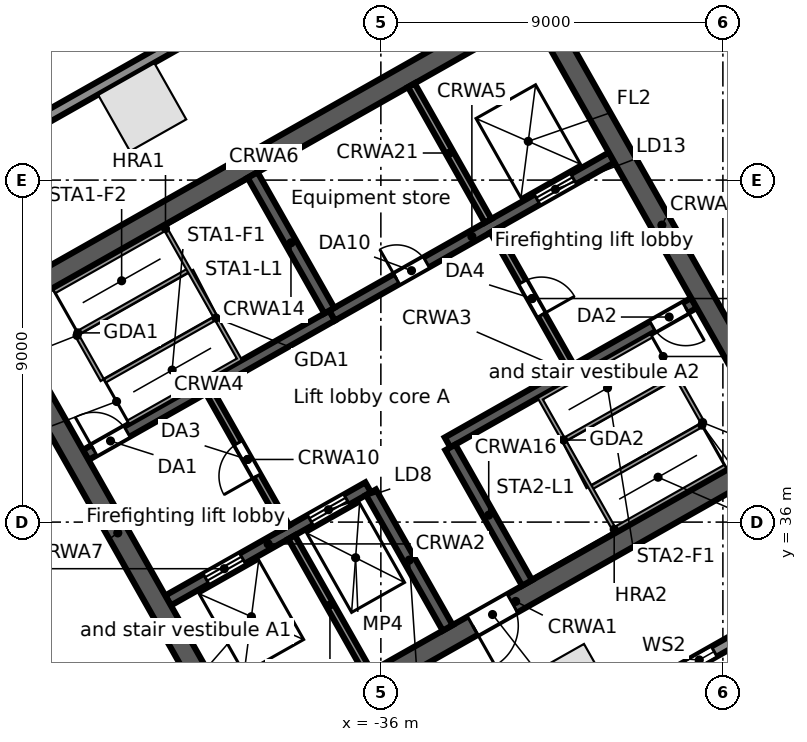
"""IFC4 building model, lengths in metres.
Left out: names, types, materials, properties, quantities, classifications, styles, units other than length and angle.
Written with IfcOpenShell. Run it as: python <this file> out.ifc"""

import sys

from ifc_helpers import new_model, si_unit, direction, frame, frame_2d, origin, origin_2d, place, context, subcontext, project, spatial, rectangle, extrude, element, fill, save


model = new_model("IFC4")
c1 = context("Model", 3, precision=1e-05, world=origin(), true_north=direction((0.0, 1.0)))
c2 = subcontext(c1, "Body", "Model", "MODEL_VIEW")
j1 = project(units=[si_unit("LENGTHUNIT", "METRE"), si_unit("PLANEANGLEUNIT", "RADIAN")], contexts=[c1])
p1 = place(None, origin())
s1 = spatial("IfcSite", under=j1, at=p1, CompositionType="ELEMENT")
p2 = place(p1, origin())
s2 = spatial("IfcBuilding", under=s1, at=p2, CompositionType="ELEMENT")
p3 = place(p2, frame((0.0, 0.0, 110.3)))
s3 = spatial("IfcBuildingStorey", under=s2, at=p3, CompositionType="ELEMENT", Elevation=110.3)
for number, where, z_axis, x_axis in (
    (1, (-42.28, 46.919, 0.0), (0.0, 0.0, 1.0), (-0.87, -0.492, 0.0)),
    (2, (-30.976, 31.635, 0.0), (0.0, 0.0, 1.0), (0.87, 0.492, 0.0)),
):
    element("IfcColumn", number, at=place(p3, frame(where, z_axis=z_axis, x_axis=x_axis)), inside=s3, PredefinedType="COLUMN", context=c2, shape_type="SweptSolid", body=[
        extrude(rectangle(XDim=1.7, YDim=1.7, at=origin_2d()), origin(), (0.0, 0.0, 1.0), 4.4),
    ])
p4 = place(p3, frame((-58.745, 38.764, 0.0), z_axis=(0.0, 0.0, 1.0), x_axis=(0.870355811726, 0.492423355453, 0.0)))
e3 = element("IfcWall", 3, at=p4, inside=s3, PredefinedType="STANDARD", context=c2, shape_type="SweptSolid", body=[
    extrude(rectangle(XDim=64.025, YDim=0.3, at=frame_2d((32.013, 0.0))), origin(), (0.0, 0.0, 1.0), 4.08),
])
p5 = place(p4, frame((60.122, 0.0, 0.6)))
e4 = element("IfcOpeningElement", 4, at=p5, cuts=e3, PredefinedType="OPENING", context=c2, shape_type="SweptSolid", body=[
    extrude(rectangle(XDim=0.9, YDim=2.8, at=frame_2d((0.45, 1.4))), frame((0.0, 0.16, 0.0), z_axis=(0.0, -1.0, 0.0), x_axis=(1.0, 0.0, 0.0)), (0.0, 0.0, 1.0), 0.32),
])
p6 = place(p4, frame((50.992, 0.0, 0.6)))
e5 = element("IfcOpeningElement", 5, at=p6, cuts=e3, PredefinedType="OPENING", context=c2, shape_type="SweptSolid", body=[
    extrude(rectangle(XDim=0.9, YDim=2.8, at=frame_2d((0.45, 1.4))), frame((0.0, 0.16, 0.0), z_axis=(0.0, -1.0, 0.0), x_axis=(1.0, 0.0, 0.0)), (0.0, 0.0, 1.0), 0.32),
])
p7 = place(p4, frame((41.862, 0.0, 0.6)))
e6 = element("IfcOpeningElement", 6, at=p7, cuts=e3, PredefinedType="OPENING", context=c2, shape_type="SweptSolid", body=[
    extrude(rectangle(XDim=0.9, YDim=2.8, at=frame_2d((0.45, 1.4))), frame((0.0, 0.16, 0.0), z_axis=(0.0, -1.0, 0.0), x_axis=(1.0, 0.0, 0.0)), (0.0, 0.0, 1.0), 0.32),
])
p8 = place(p4, frame((32.732, 0.0, 0.6)))
e7 = element("IfcOpeningElement", 7, at=p8, cuts=e3, PredefinedType="OPENING", context=c2, shape_type="SweptSolid", body=[
    extrude(rectangle(XDim=0.9, YDim=2.8, at=frame_2d((0.45, 1.4))), frame((0.0, 0.16, 0.0), z_axis=(0.0, -1.0, 0.0), x_axis=(1.0, 0.0, 0.0)), (0.0, 0.0, 1.0), 0.32),
])
p9 = place(p4, frame((23.602, 0.0, 0.6)))
e8 = element("IfcOpeningElement", 8, at=p9, cuts=e3, PredefinedType="OPENING", context=c2, shape_type="SweptSolid", body=[
    extrude(rectangle(XDim=0.9, YDim=2.8, at=frame_2d((0.45, 1.4))), frame((0.0, 0.16, 0.0), z_axis=(0.0, -1.0, 0.0), x_axis=(1.0, 0.0, 0.0)), (0.0, 0.0, 1.0), 0.32),
])
p10 = place(p4, frame((14.472, 0.0, 0.6)))
e9 = element("IfcOpeningElement", 9, at=p10, cuts=e3, PredefinedType="OPENING", context=c2, shape_type="SweptSolid", body=[
    extrude(rectangle(XDim=0.9, YDim=2.8, at=frame_2d((0.45, 1.4))), frame((0.0, 0.16, 0.0), z_axis=(0.0, -1.0, 0.0), x_axis=(1.0, 0.0, 0.0)), (0.0, 0.0, 1.0), 0.32),
])
p11 = place(p4, frame((5.342, 0.0, 0.6)))
e10 = element("IfcOpeningElement", 10, at=p11, cuts=e3, PredefinedType="OPENING", context=c2, shape_type="SweptSolid", body=[
    extrude(rectangle(XDim=0.9, YDim=2.8, at=frame_2d((0.45, 1.4))), frame((0.0, 0.16, 0.0), z_axis=(0.0, -1.0, 0.0), x_axis=(1.0, 0.0, 0.0)), (0.0, 0.0, 1.0), 0.32),
])
p12 = place(p3, frame((-44.109, 26.504, 0.0), z_axis=(0.0, 0.0, 1.0), x_axis=(-0.857169502585, 0.515034410344, 0.0)))
e11 = element("IfcWall", 11, at=p12, inside=s3, PredefinedType="STANDARD", context=c2, shape_type="SweptSolid", body=[
    extrude(rectangle(XDim=17.127, YDim=0.3, at=frame_2d((8.563, 0.0))), origin(), (0.0, 0.0, 1.0), 4.08),
])
p13 = place(p12, frame((13.403, 0.0, 0.6)))
e12 = element("IfcOpeningElement", 12, at=p13, cuts=e11, PredefinedType="OPENING", context=c2, shape_type="SweptSolid", body=[
    extrude(rectangle(XDim=0.9, YDim=2.8, at=frame_2d((0.45, 1.4))), frame((0.0, 0.16, 0.0), z_axis=(0.0, -1.0, 0.0), x_axis=(1.0, 0.0, 0.0)), (0.0, 0.0, 1.0), 0.32),
])
p14 = place(p12, frame((4.903, 0.0, 0.6)))
e13 = element("IfcOpeningElement", 13, at=p14, cuts=e11, PredefinedType="OPENING", context=c2, shape_type="SweptSolid", body=[
    extrude(rectangle(XDim=0.9, YDim=2.8, at=frame_2d((0.45, 1.4))), frame((0.0, 0.16, 0.0), z_axis=(0.0, -1.0, 0.0), x_axis=(1.0, 0.0, 0.0)), (0.0, 0.0, 1.0), 0.32),
])
p15 = place(p3, frame((-0.055, 47.969, 0.0), z_axis=(0.0, 0.0, 1.0), x_axis=(-0.870355730478, -0.492423499058, 0.0)))
e14 = element("IfcWall", 14, at=p15, inside=s3, PredefinedType="STANDARD", context=c2, shape_type="SweptSolid", body=[
    extrude(rectangle(XDim=43.75, YDim=0.3, at=frame_2d((21.875, 0.0))), origin(), (0.0, 0.0, 1.0), 4.08),
])
p16 = place(p15, frame((39.977, 0.0, 0.6)))
e15 = element("IfcOpeningElement", 15, at=p16, cuts=e14, PredefinedType="OPENING", context=c2, shape_type="SweptSolid", body=[
    extrude(rectangle(XDim=0.9, YDim=2.8, at=frame_2d((0.45, 1.4))), frame((0.0, 0.16, 0.0), z_axis=(0.0, -1.0, 0.0), x_axis=(1.0, 0.0, 0.0)), (0.0, 0.0, 1.0), 0.32),
])
p17 = place(p15, frame((31.222, 0.0, 0.6)))
e16 = element("IfcOpeningElement", 16, at=p17, cuts=e14, PredefinedType="OPENING", context=c2, shape_type="SweptSolid", body=[
    extrude(rectangle(XDim=0.9, YDim=2.8, at=frame_2d((0.45, 1.4))), frame((0.0, 0.16, 0.0), z_axis=(0.0, -1.0, 0.0), x_axis=(1.0, 0.0, 0.0)), (0.0, 0.0, 1.0), 0.32),
])
p18 = place(p15, frame((22.468, 0.0, 0.6)))
e17 = element("IfcOpeningElement", 17, at=p18, cuts=e14, PredefinedType="OPENING", context=c2, shape_type="SweptSolid", body=[
    extrude(rectangle(XDim=0.9, YDim=2.8, at=frame_2d((0.45, 1.4))), frame((0.0, 0.16, 0.0), z_axis=(0.0, -1.0, 0.0), x_axis=(1.0, 0.0, 0.0)), (0.0, 0.0, 1.0), 0.32),
])
p19 = place(p15, frame((13.713, 0.0, 0.6)))
e18 = element("IfcOpeningElement", 18, at=p19, cuts=e14, PredefinedType="OPENING", context=c2, shape_type="SweptSolid", body=[
    extrude(rectangle(XDim=0.9, YDim=2.8, at=frame_2d((0.45, 1.4))), frame((0.0, 0.16, 0.0), z_axis=(0.0, -1.0, 0.0), x_axis=(1.0, 0.0, 0.0)), (0.0, 0.0, 1.0), 0.32),
])
p20 = place(p15, frame((4.959, 0.0, 0.6)))
e19 = element("IfcOpeningElement", 19, at=p20, cuts=e14, PredefinedType="OPENING", context=c2, shape_type="SweptSolid", body=[
    extrude(rectangle(XDim=0.9, YDim=2.8, at=frame_2d((0.45, 1.4))), frame((0.0, 0.16, 0.0), z_axis=(0.0, -1.0, 0.0), x_axis=(1.0, 0.0, 0.0)), (0.0, 0.0, 1.0), 0.32),
])
p21 = place(p3, frame((-39.85, 29.727, 0.0), z_axis=(0.0, 0.0, 1.0), x_axis=(0.870359753402, 0.492416388494, 0.0)))
e20 = element("IfcWall", 20, at=p21, inside=s3, PredefinedType="SOLIDWALL", context=c2, shape_type="SweptSolid", body=[
    extrude(rectangle(XDim=17.0, YDim=0.55, at=frame_2d((8.5, 0.0))), origin(), (0.0, 0.0, 1.0), 4.08),
])
p22 = place(p21, frame((7.2, 0.0, 0.0)))
e21 = element("IfcOpeningElement", 21, at=p22, cuts=e20, PredefinedType="OPENING", context=c2, shape_type="SweptSolid", body=[
    extrude(rectangle(XDim=1.2, YDim=2.1, at=frame_2d((0.6, 1.05))), frame((0.0, 0.285, 0.0), z_axis=(0.0, -1.0, 0.0), x_axis=(1.0, 0.0, 0.0)), (0.0, 0.0, 1.0), 0.57),
])
p23 = place(p3, frame((-41.6, 33.936, 0.0), z_axis=(0.0, 0.0, 1.0), x_axis=(0.870348557882, 0.492436176365, 0.0)))
e22 = element("IfcWall", 22, at=p23, inside=s3, PredefinedType="SOLIDWALL", context=c2, shape_type="SweptSolid", body=[
    extrude(rectangle(XDim=6.05, YDim=0.3, at=frame_2d((3.025, 0.0))), origin(), (0.0, 0.0, 1.0), 4.08),
])
p24 = place(p23, frame((1.15, 0.0, 0.0)))
e23 = element("IfcOpeningElement", 23, at=p24, cuts=e22, PredefinedType="OPENING", context=c2, shape_type="SweptSolid", body=[
    extrude(rectangle(XDim=1.1, YDim=2.1, at=frame_2d((0.55, 1.05))), frame((0.0, 0.16, 0.0), z_axis=(0.0, -1.0, 0.0), x_axis=(1.0, 0.0, 0.0)), (0.0, 0.0, 1.0), 0.32),
])
p25 = place(p23, frame((4.3, 0.0, 0.0)))
e24 = element("IfcOpeningElement", 24, at=p25, cuts=e22, PredefinedType="OPENING", context=c2, shape_type="SweptSolid", body=[
    extrude(rectangle(XDim=1.1, YDim=2.1, at=frame_2d((0.55, 1.05))), frame((0.0, 0.16, 0.0), z_axis=(0.0, -1.0, 0.0), x_axis=(1.0, 0.0, 0.0)), (0.0, 0.0, 1.0), 0.32),
])
p26 = place(p3, frame((-34.245, 38.097, 0.0), z_axis=(0.0, 0.0, 1.0), x_axis=(0.870360741098, 0.49241464271, 0.0)))
e25 = element("IfcWall", 25, at=p26, inside=s3, PredefinedType="SOLIDWALL", context=c2, shape_type="SweptSolid", body=[
    extrude(rectangle(XDim=7.45, YDim=0.3, at=frame_2d((3.725, 0.0))), origin(), (0.0, 0.0, 1.0), 4.08),
])
p27 = place(p26, frame((6.2, 0.0, 0.0)))
e26 = element("IfcOpeningElement", 26, at=p27, cuts=e25, PredefinedType="OPENING", context=c2, shape_type="SweptSolid", body=[
    extrude(rectangle(XDim=1.0, YDim=2.1, at=frame_2d((0.5, 1.05))), frame((0.0, 0.16, 0.0), z_axis=(0.0, -1.0, 0.0), x_axis=(1.0, 0.0, 0.0)), (0.0, 0.0, 1.0), 0.32),
])
p28 = place(p3, frame((-43.766, 37.766, 0.0), z_axis=(0.0, 0.0, 1.0), x_axis=(0.870346696097, 0.492439466932, 0.0)))
e27 = element("IfcWall", 27, at=p28, inside=s3, PredefinedType="SOLIDWALL", context=c2, shape_type="SweptSolid", body=[
    extrude(rectangle(XDim=7.45, YDim=0.3, at=frame_2d((3.725, 0.0))), origin(), (0.0, 0.0, 1.0), 4.08),
])
p29 = place(p28, frame((0.25, 0.0, 0.0)))
e28 = element("IfcOpeningElement", 28, at=p29, cuts=e27, PredefinedType="OPENING", context=c2, shape_type="SweptSolid", body=[
    extrude(rectangle(XDim=1.0, YDim=2.1, at=frame_2d((0.5, 1.05))), frame((0.0, 0.16, 0.0), z_axis=(0.0, -1.0, 0.0), x_axis=(1.0, 0.0, 0.0)), (0.0, 0.0, 1.0), 0.32),
])
p30 = place(p3, frame((-37.282, 41.435, 0.0), z_axis=(0.0, 0.0, 1.0), x_axis=(0.870359895813, 0.492416136779, 0.0)))
e29 = element("IfcWall", 29, at=p30, inside=s3, PredefinedType="SOLIDWALL", context=c2, shape_type="SweptSolid", body=[
    extrude(rectangle(XDim=8.45, YDim=0.3, at=frame_2d((4.225, 0.0))), origin(), (0.0, 0.0, 1.0), 4.08),
])
p31 = place(p30, frame((6.2, 0.0, 0.0)))
e30 = element("IfcOpeningElement", 30, at=p31, cuts=e29, PredefinedType="OPENING", context=c2, shape_type="SweptSolid", body=[
    extrude(rectangle(XDim=1.1, YDim=2.1, at=frame_2d((0.55, 1.05))), frame((0.0, 0.16, 0.0), z_axis=(0.0, -1.0, 0.0), x_axis=(1.0, 0.0, 0.0)), (0.0, 0.0, 1.0), 0.32),
])
p32 = place(p30, frame((1.95, 0.0, 0.0)))
e31 = element("IfcOpeningElement", 31, at=p32, cuts=e29, PredefinedType="OPENING", context=c2, shape_type="SweptSolid", body=[
    extrude(rectangle(XDim=0.9, YDim=2.1, at=frame_2d((0.45, 1.05))), frame((0.0, 0.16, 0.0), z_axis=(0.0, -1.0, 0.0), x_axis=(1.0, 0.0, 0.0)), (0.0, 0.0, 1.0), 0.32),
])
p33 = place(p3, frame((-46.473, 41.434, 0.0), z_axis=(0.0, 0.0, 1.0), x_axis=(0.870359753402, 0.492416388494, 0.0)))
e32 = element("IfcWall", 32, at=p33, inside=s3, PredefinedType="SOLIDWALL", context=c2, shape_type="SweptSolid", body=[
    extrude(rectangle(XDim=17.0, YDim=0.55, at=frame_2d((8.5, 0.0))), origin(), (0.0, 0.0, 1.0), 4.08),
])
p34 = place(p3, frame((-46.098, 41.33, 0.0), z_axis=(0.0, 0.0, 1.0), x_axis=(0.492418910884, -0.870358326325, 0.0)))
e33 = element("IfcWall", 33, at=p34, inside=s3, PredefinedType="SOLIDWALL", context=c2, shape_type="SweptSolid", body=[
    extrude(rectangle(XDim=12.9, YDim=0.55, at=frame_2d((6.45, 0.0))), origin(), (0.0, 0.0, 1.0), 4.08),
])
p35 = place(p3, frame((-38.349, 35.603, 0.0), z_axis=(0.0, 0.0, 1.0), x_axis=(0.492382931784, -0.870378681085, 0.0)))
e34 = element("IfcWall", 34, at=p35, inside=s3, PredefinedType="SOLIDWALL", context=c2, shape_type="SweptSolid", body=[
    extrude(rectangle(XDim=4.1, YDim=0.2, at=frame_2d((2.05, 0.0))), origin(), (0.0, 0.0, 1.0), 4.08),
])
p36 = place(p3, frame((-40.516, 39.433, 0.0), z_axis=(0.0, 0.0, 1.0), x_axis=(0.492453559952, -0.87033872216, 0.0)))
e35 = element("IfcWall", 35, at=p36, inside=s3, PredefinedType="PARTITIONING", context=c2, shape_type="SweptSolid", body=[
    extrude(rectangle(XDim=4.1, YDim=0.2, at=frame_2d((2.05, 0.0))), origin(), (0.0, 0.0, 1.0), 4.08),
])
p37 = place(p36, frame((1.55, 0.0, 0.0)))
e36 = element("IfcOpeningElement", 36, at=p37, cuts=e35, PredefinedType="OPENING", context=c2, shape_type="SweptSolid", body=[
    extrude(rectangle(XDim=1.0, YDim=2.1, at=frame_2d((0.5, 1.05))), frame((0.0, 0.11, 0.0), z_axis=(0.0, -1.0, 0.0), x_axis=(1.0, 0.0, 0.0)), (0.0, 0.0, 1.0), 0.22),
])
p38 = place(p3, frame((-36.26, 36.785, 0.0), z_axis=(0.0, 0.0, 1.0), x_axis=(0.492408451753, -0.87036424366, 0.0)))
e37 = element("IfcWall", 37, at=p38, inside=s3, PredefinedType="SOLIDWALL", context=c2, shape_type="SweptSolid", body=[
    extrude(rectangle(XDim=4.1, YDim=0.3, at=frame_2d((2.05, 0.0))), origin(), (0.0, 0.0, 1.0), 4.08),
])
for number, where, z_axis, x_axis in (
    (38, (-39.375, 45.134, 0.0), (0.0, 0.0, 1.0), (0.492, -0.87, 0.0)),
    (39, (-34.171, 37.967, 0.0), (0.0, 0.0, 1.0), (0.492, -0.87, 0.0)),
):
    element("IfcWall", number, at=place(p3, frame(where, z_axis=z_axis, x_axis=x_axis)), inside=s3, PredefinedType="SOLIDWALL", context=c2, shape_type="SweptSolid", body=[
        extrude(rectangle(XDim=4.1, YDim=0.3, at=frame_2d((2.05, 0.0))), origin(), (0.0, 0.0, 1.0), 4.08),
    ])
p39 = place(p3, frame((-33.031, 43.667, 0.0), z_axis=(0.0, 0.0, 1.0), x_axis=(0.492408451753, -0.87036424366, 0.0)))
e40 = element("IfcWall", 40, at=p39, inside=s3, PredefinedType="PARTITIONING", context=c2, shape_type="SweptSolid", body=[
    extrude(rectangle(XDim=4.1, YDim=0.2, at=frame_2d((2.05, 0.0))), origin(), (0.0, 0.0, 1.0), 4.08),
])
p40 = place(p39, frame((1.55, 0.0, 0.0)))
e41 = element("IfcOpeningElement", 41, at=p40, cuts=e40, PredefinedType="OPENING", context=c2, shape_type="SweptSolid", body=[
    extrude(rectangle(XDim=1.0, YDim=2.1, at=frame_2d((0.5, 1.05))), frame((0.0, 0.11, 0.0), z_axis=(0.0, -1.0, 0.0), x_axis=(1.0, 0.0, 0.0)), (0.0, 0.0, 1.0), 0.22),
])
p41 = place(p3, frame((-35.197, 47.497, 0.0), z_axis=(0.0, 0.0, 1.0), x_axis=(0.492453559952, -0.87033872216, 0.0)))
e42 = element("IfcWall", 42, at=p41, inside=s3, PredefinedType="SOLIDWALL", context=c2, shape_type="SweptSolid", body=[
    extrude(rectangle(XDim=4.1, YDim=0.2, at=frame_2d((2.05, 0.0))), origin(), (0.0, 0.0, 1.0), 4.08),
])
p42 = place(p3, frame((-31.781, 49.43, 0.0), z_axis=(0.0, 0.0, 1.0), x_axis=(0.492427022044, -0.870353737259, 0.0)))
e43 = element("IfcWall", 43, at=p42, inside=s3, PredefinedType="SOLIDWALL", context=c2, shape_type="SweptSolid", body=[
    extrude(rectangle(XDim=12.9, YDim=0.55, at=frame_2d((6.45, 0.0))), origin(), (0.0, 0.0, 1.0), 4.08),
])
p43 = place(p17, origin())
e44 = element("IfcWindow", 44, at=p43, inside=s3, PartitioningType="SINGLE_PANEL", PredefinedType="WINDOW", context=c2, shape_type="SweptSolid", body=[
    extrude(rectangle(XDim=0.9, YDim=2.8, at=frame_2d((0.45, 1.4))), frame((0.0, 0.03, 0.0), z_axis=(0.0, -1.0, 0.0), x_axis=(1.0, 0.0, 0.0)), (0.0, 0.0, 1.0), 0.06),
])
fill(e16, e44)
p44 = place(p31, origin())
e45 = element("IfcDoor", 45, at=p44, inside=s3, OperationType="DOUBLE_DOOR_SLIDING", PredefinedType="DOOR", context=c2, shape_type="SweptSolid", body=[
    extrude(rectangle(XDim=1.1, YDim=2.1, at=frame_2d((0.55, 1.05))), frame((0.0, 0.025, 0.0), z_axis=(0.0, -1.0, 0.0), x_axis=(1.0, 0.0, 0.0)), (0.0, 0.0, 1.0), 0.05),
])
fill(e30, e45)
p45 = place(p24, origin())
e46 = element("IfcDoor", 46, at=p45, inside=s3, OperationType="DOUBLE_DOOR_SLIDING", PredefinedType="DOOR", context=c2, shape_type="SweptSolid", body=[
    extrude(rectangle(XDim=1.1, YDim=2.1, at=frame_2d((0.55, 1.05))), frame((0.0, 0.025, 0.0), z_axis=(0.0, -1.0, 0.0), x_axis=(1.0, 0.0, 0.0)), (0.0, 0.0, 1.0), 0.05),
])
fill(e23, e46)
p46 = place(p25, origin())
e47 = element("IfcDoor", 47, at=p46, inside=s3, OperationType="DOUBLE_DOOR_SLIDING", PredefinedType="DOOR", context=c2, shape_type="SweptSolid", body=[
    extrude(rectangle(XDim=1.1, YDim=2.1, at=frame_2d((0.55, 1.05))), frame((0.0, 0.025, 0.0), z_axis=(0.0, -1.0, 0.0), x_axis=(1.0, 0.0, 0.0)), (0.0, 0.0, 1.0), 0.05),
])
fill(e24, e47)
p47 = place(p29, origin())
e48 = element("IfcDoor", 48, at=p47, inside=s3, OperationType="SINGLE_SWING_LEFT", PredefinedType="DOOR", context=c2, shape_type="SweptSolid", body=[
    extrude(rectangle(XDim=1.0, YDim=2.1, at=frame_2d((0.5, 1.05))), frame((0.0, 0.025, 0.0), z_axis=(0.0, -1.0, 0.0), x_axis=(1.0, 0.0, 0.0)), (0.0, 0.0, 1.0), 0.05),
])
fill(e28, e48)
p48 = place(p27, frame((1.0, 0.0, 0.0), z_axis=(0.0, 0.0, 1.0), x_axis=(-1.0, 0.0, 0.0)))
e49 = element("IfcDoor", 49, at=p48, inside=s3, OperationType="SINGLE_SWING_LEFT", PredefinedType="DOOR", context=c2, shape_type="SweptSolid", body=[
    extrude(rectangle(XDim=1.0, YDim=2.1, at=frame_2d((0.5, 1.05))), frame((0.0, 0.025, 0.0), z_axis=(0.0, -1.0, 0.0), x_axis=(1.0, 0.0, 0.0)), (0.0, 0.0, 1.0), 0.05),
])
fill(e26, e49)
p49 = place(p37, frame((1.0, 0.0, 0.0), z_axis=(0.0, 0.0, 1.0), x_axis=(-1.0, 0.0, 0.0)))
e50 = element("IfcDoor", 50, at=p49, inside=s3, OperationType="SINGLE_SWING_LEFT", PredefinedType="DOOR", context=c2, shape_type="SweptSolid", body=[
    extrude(rectangle(XDim=1.0, YDim=2.1, at=frame_2d((0.5, 1.05))), frame((0.0, 0.025, 0.0), z_axis=(0.0, -1.0, 0.0), x_axis=(1.0, 0.0, 0.0)), (0.0, 0.0, 1.0), 0.05),
])
fill(e36, e50)
p50 = place(p40, origin())
e51 = element("IfcDoor", 51, at=p50, inside=s3, OperationType="SINGLE_SWING_RIGHT", PredefinedType="DOOR", context=c2, shape_type="SweptSolid", body=[
    extrude(rectangle(XDim=1.0, YDim=2.1, at=frame_2d((0.5, 1.05))), frame((0.0, 0.025, 0.0), z_axis=(0.0, -1.0, 0.0), x_axis=(1.0, 0.0, 0.0)), (0.0, 0.0, 1.0), 0.05),
])
fill(e41, e51)
p51 = place(p22, frame((1.2, 0.0, 0.0), z_axis=(0.0, 0.0, 1.0), x_axis=(-1.0, 0.0, 0.0)))
e52 = element("IfcDoor", 52, at=p51, inside=s3, OperationType="SINGLE_SWING_RIGHT", PredefinedType="DOOR", context=c2, shape_type="SweptSolid", body=[
    extrude(rectangle(XDim=1.2, YDim=2.1, at=frame_2d((0.6, 1.05))), frame((0.0, 0.025, 0.0), z_axis=(0.0, -1.0, 0.0), x_axis=(1.0, 0.0, 0.0)), (0.0, 0.0, 1.0), 0.05),
])
fill(e21, e52)
p52 = place(p32, origin())
e53 = element("IfcDoor", 53, at=p52, inside=s3, OperationType="SINGLE_SWING_LEFT", PredefinedType="DOOR", context=c2, shape_type="SweptSolid", body=[
    extrude(rectangle(XDim=0.9, YDim=2.1, at=frame_2d((0.45, 1.05))), frame((0.0, 0.025, 0.0), z_axis=(0.0, -1.0, 0.0), x_axis=(1.0, 0.0, 0.0)), (0.0, 0.0, 1.0), 0.05),
])
fill(e31, e53)
save(model, sys.argv[1])
